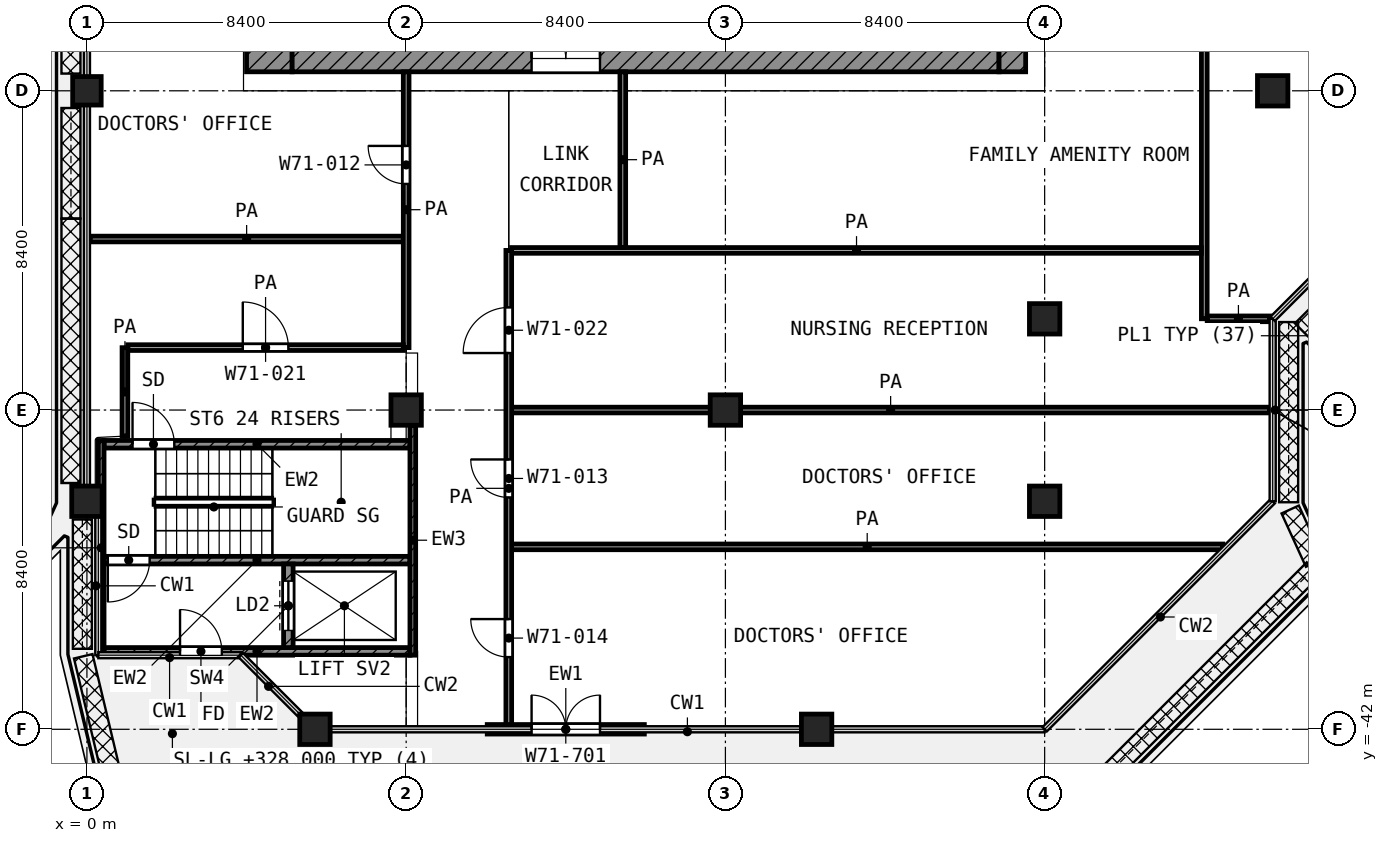
"""IFC4 building model, lengths in metres.
Left out: names, types, materials, properties, quantities, classifications, styles, units other than length and angle.
Written with IfcOpenShell. Run it as: python <this file> out.ifc"""

import sys

from ifc_helpers import new_model, si_unit, direction, frame, frame_2d, origin, origin_2d, place, context, subcontext, project, spatial, rectangle, extrude, element, fill, save


model = new_model("IFC4")
c1 = context("Model", 3, precision=1e-05, world=origin(), true_north=direction((0.0, 1.0)))
c2 = subcontext(c1, "Body", "Model", "MODEL_VIEW")
j1 = project(units=[si_unit("LENGTHUNIT", "METRE"), si_unit("PLANEANGLEUNIT", "RADIAN")], contexts=[c1])
p1 = place(None, origin())
s1 = spatial("IfcSite", under=j1, at=p1, CompositionType="ELEMENT")
p2 = place(p1, origin())
s2 = spatial("IfcBuilding", under=s1, at=p2, CompositionType="ELEMENT")
p3 = place(p2, frame((0.0, 0.0, 328.0)))
s3 = spatial("IfcBuildingStorey", under=s2, at=p3, CompositionType="ELEMENT", Elevation=328.0)
p4 = place(p3, frame((0.0, -25.2, 0.0), z_axis=(0.0, 0.0, 1.0), x_axis=(1.0, 0.0, 0.0)))
e1 = element("IfcColumn", 1, at=p4, inside=s3, PredefinedType="COLUMN", context=c2, shape_type="SweptSolid", body=[
    extrude(rectangle(XDim=0.75, YDim=0.75, at=origin_2d()), origin(), (0.0, 0.0, 1.0), 4.2),
])
for number, where, z_axis, x_axis in (
    (2, (31.2, -25.2, 0.0), (0.0, 0.0, 1.0), (1.0, 0.0, 0.0)),
    (3, (25.2, -31.2, 0.0), (0.0, 0.0, 1.0), (1.0, 0.0, 0.0)),
    (4, (8.4, -33.6, 0.0), (0.0, 0.0, 1.0), (1.0, 0.0, 0.0)),
    (5, (16.8, -33.6, 0.0), (0.0, 0.0, 1.0), (1.0, 0.0, 0.0)),
    (6, (0.0, -36.0, 0.0), (0.0, 0.0, 1.0), (1.0, 0.0, 0.0)),
    (7, (25.2, -36.0, 0.0), (0.0, 0.0, 1.0), (1.0, 0.0, 0.0)),
    (8, (6.0, -42.0, 0.0), (0.0, 0.0, 1.0), (1.0, 0.0, 0.0)),
    (9, (19.2, -42.0, 0.0), (0.0, 0.0, 1.0), (1.0, 0.0, 0.0)),
):
    element("IfcColumn", number, at=place(p3, frame(where, z_axis=z_axis, x_axis=x_axis)), inside=s3, PredefinedType="COLUMN", context=c2, shape_type="SweptSolid", body=[
        extrude(rectangle(XDim=0.8, YDim=0.8, at=origin_2d()), origin(), (0.0, 0.0, 1.0), 4.2),
    ])
p5 = place(p3, frame((10.533, -42.0, 0.0), z_axis=(0.0, 0.0, 1.0), x_axis=(1.0, 0.0, 0.0)))
e10 = element("IfcWall", 10, at=p5, inside=s3, PredefinedType="SOLIDWALL", context=c2, shape_type="SweptSolid", body=[
    extrude(rectangle(XDim=4.133, YDim=0.25, at=frame_2d((2.067, 0.0))), origin(), (0.0, 0.0, 1.0), 3.66),
])
p6 = place(p5, frame((1.167, 0.0, 0.0)))
e11 = element("IfcOpeningElement", 11, at=p6, cuts=e10, PredefinedType="OPENING", context=c2, shape_type="SweptSolid", body=[
    extrude(rectangle(XDim=1.8, YDim=2.1, at=frame_2d((0.9, 1.05))), frame((0.0, 0.135, 0.0), z_axis=(0.0, -1.0, 0.0), x_axis=(1.0, 0.0, 0.0)), (0.0, 0.0, 1.0), 0.27),
])
p7 = place(p3, frame((4.8, -24.7, 0.0), z_axis=(0.0, 0.0, 1.0), x_axis=(0.0, 1.0, 0.0)))
e12 = element("IfcWall", 12, at=p7, inside=s3, PredefinedType="SHEAR", context=c2, shape_type="SweptSolid", body=[
    extrude(rectangle(XDim=19.3, YDim=1.2, at=frame_2d((9.65, 0.0))), origin(), (0.0, 0.0, 1.0), 3.78),
])
p8 = place(p7, frame((11.15, 0.0, 0.0)))
e13 = element("IfcOpeningElement", 13, at=p8, cuts=e12, PredefinedType="OPENING", context=c2, shape_type="SweptSolid", body=[
    extrude(rectangle(XDim=1.1, YDim=2.1, at=frame_2d((0.55, 1.05))), frame((0.0, 0.61, 0.0), z_axis=(0.0, -1.0, 0.0), x_axis=(1.0, 0.0, 0.0)), (0.0, 0.0, 1.0), 1.22),
])
p9 = place(p7, frame((1.85, 0.0, 0.0)))
e14 = element("IfcOpeningElement", 14, at=p9, cuts=e12, PredefinedType="OPENING", context=c2, shape_type="SweptSolid", body=[
    extrude(rectangle(XDim=1.1, YDim=2.1, at=frame_2d((0.55, 1.05))), frame((0.0, 0.61, 0.0), z_axis=(0.0, -1.0, 0.0), x_axis=(1.0, 0.0, 0.0)), (0.0, 0.0, 1.0), 1.22),
])
p10 = place(p3, frame((5.4, -24.35, 0.0), z_axis=(0.0, 0.0, 1.0), x_axis=(1.0, 0.0, 0.0)))
e15 = element("IfcWall", 15, at=p10, inside=s3, PredefinedType="SHEAR", context=c2, shape_type="SweptSolid", body=[
    extrude(rectangle(XDim=18.6, YDim=0.7, at=frame_2d((9.3, 0.0))), origin(), (0.0, 0.0, 1.0), 3.78),
])
p11 = place(p10, frame((6.3, 0.0, 0.0)))
e16 = element("IfcOpeningElement", 16, at=p11, cuts=e15, PredefinedType="OPENING", context=c2, shape_type="SweptSolid", body=[
    extrude(rectangle(XDim=1.8, YDim=2.1, at=frame_2d((0.9, 1.05))), frame((0.0, 0.36, 0.0), z_axis=(0.0, -1.0, 0.0), x_axis=(1.0, 0.0, 0.0)), (0.0, 0.0, 1.0), 0.72),
])
p12 = place(p3, frame((24.35, -24.7, 0.0), z_axis=(0.0, 0.0, 1.0), x_axis=(0.0, 1.0, 0.0)))
e17 = element("IfcWall", 17, at=p12, inside=s3, PredefinedType="SHEAR", context=c2, shape_type="SweptSolid", body=[
    extrude(rectangle(XDim=0.7, YDim=0.7, at=frame_2d((0.35, 0.0))), origin(), (0.0, 0.0, 1.0), 3.78),
])
p13 = place(p3, frame((0.375, -40.05, 0.0), z_axis=(0.0, 0.0, 1.0), x_axis=(0.0, 1.0, 0.0)))
e18 = element("IfcWall", 18, at=p13, inside=s3, PredefinedType="SHEAR", context=c2, shape_type="SweptSolid", body=[
    extrude(rectangle(XDim=5.65, YDim=0.15, at=frame_2d((2.825, 0.0))), origin(), (0.0, 0.0, 1.0), 3.78),
])
p14 = place(p3, frame((8.575, -40.05, 0.0), z_axis=(0.0, 0.0, 1.0), x_axis=(0.0, 1.0, 0.0)))
e19 = element("IfcWall", 19, at=p14, inside=s3, PredefinedType="SHEAR", context=c2, shape_type="SweptSolid", body=[
    extrude(rectangle(XDim=6.05, YDim=0.15, at=frame_2d((3.025, 0.0))), origin(), (0.0, 0.0, 1.0), 3.78),
])
p15 = place(p3, frame((0.45, -34.5, 0.0), z_axis=(0.0, 0.0, 1.0), x_axis=(1.0, 0.0, 0.0)))
e20 = element("IfcWall", 20, at=p15, inside=s3, PredefinedType="SHEAR", context=c2, shape_type="SweptSolid", body=[
    extrude(rectangle(XDim=8.05, YDim=0.2, at=frame_2d((4.025, 0.0))), origin(), (0.0, 0.0, 1.0), 3.78),
])
p16 = place(p15, frame((0.75, 0.0, 0.0)))
e21 = element("IfcOpeningElement", 21, at=p16, cuts=e20, PredefinedType="OPENING", context=c2, shape_type="SweptSolid", body=[
    extrude(rectangle(XDim=1.1, YDim=2.1, at=frame_2d((0.55, 1.05))), frame((0.0, 0.11, 0.0), z_axis=(0.0, -1.0, 0.0), x_axis=(1.0, 0.0, 0.0)), (0.0, 0.0, 1.0), 0.22),
])
p17 = place(p3, frame((0.45, -37.55, 0.0), z_axis=(0.0, 0.0, 1.0), x_axis=(1.0, 0.0, 0.0)))
e22 = element("IfcWall", 22, at=p17, inside=s3, PredefinedType="SHEAR", context=c2, shape_type="SweptSolid", body=[
    extrude(rectangle(XDim=8.05, YDim=0.2, at=frame_2d((4.025, 0.0))), origin(), (0.0, 0.0, 1.0), 3.78),
])
p18 = place(p17, frame((0.1, 0.0, 0.0)))
e23 = element("IfcOpeningElement", 23, at=p18, cuts=e22, PredefinedType="OPENING", context=c2, shape_type="SweptSolid", body=[
    extrude(rectangle(XDim=1.1, YDim=2.1, at=frame_2d((0.55, 1.05))), frame((0.0, 0.11, 0.0), z_axis=(0.0, -1.0, 0.0), x_axis=(1.0, 0.0, 0.0)), (0.0, 0.0, 1.0), 0.22),
])
p19 = place(p3, frame((0.45, -39.95, 0.0), z_axis=(0.0, 0.0, 1.0), x_axis=(1.0, 0.0, 0.0)))
e24 = element("IfcWall", 24, at=p19, inside=s3, PredefinedType="SHEAR", context=c2, shape_type="SweptSolid", body=[
    extrude(rectangle(XDim=8.05, YDim=0.2, at=frame_2d((4.025, 0.0))), origin(), (0.0, 0.0, 1.0), 3.78),
])
p20 = place(p19, frame((2.0, 0.0, 0.0)))
e25 = element("IfcOpeningElement", 25, at=p20, cuts=e24, PredefinedType="OPENING", context=c2, shape_type="SweptSolid", body=[
    extrude(rectangle(XDim=1.1, YDim=2.1, at=frame_2d((0.55, 1.05))), frame((0.0, 0.11, 0.0), z_axis=(0.0, -1.0, 0.0), x_axis=(1.0, 0.0, 0.0)), (0.0, 0.0, 1.0), 0.22),
])
p21 = place(p3, frame((5.3, -39.85, 0.0), z_axis=(0.0, 0.0, 1.0), x_axis=(0.0, 1.0, 0.0)))
e26 = element("IfcWall", 26, at=p21, inside=s3, PredefinedType="SHEAR", context=c2, shape_type="SweptSolid", body=[
    extrude(rectangle(XDim=2.2, YDim=0.25, at=frame_2d((1.1, 0.0))), origin(), (0.0, 0.0, 1.0), 3.78),
])
p22 = place(p21, frame((0.45, 0.0, 0.0)))
e27 = element("IfcOpeningElement", 27, at=p22, cuts=e26, PredefinedType="OPENING", context=c2, shape_type="SweptSolid", body=[
    extrude(rectangle(XDim=1.3, YDim=2.1, at=frame_2d((0.65, 1.05))), frame((0.0, 0.135, 0.0), z_axis=(0.0, -1.0, 0.0), x_axis=(1.0, 0.0, 0.0)), (0.0, 0.0, 1.0), 0.27),
])
p23 = place(p3, frame((11.175, -37.2, 0.0), z_axis=(0.0, 0.0, 1.0), x_axis=(1.0, 0.0, 0.0)))
e28 = element("IfcWall", 28, at=p23, inside=s3, PredefinedType="PARTITIONING", context=c2, shape_type="SweptSolid", body=[
    extrude(rectangle(XDim=18.712, YDim=0.15, at=frame_2d((9.356, 0.0))), origin(), (0.0, 0.0, 1.0), 3.78),
])
p24 = place(p3, frame((11.175, -33.6, 0.0), z_axis=(0.0, 0.0, 1.0), x_axis=(1.0, 0.0, 0.0)))
e29 = element("IfcWall", 29, at=p24, inside=s3, PredefinedType="PARTITIONING", context=c2, shape_type="SweptSolid", body=[
    extrude(rectangle(XDim=19.945, YDim=0.15, at=frame_2d((9.973, 0.0))), origin(), (0.0, 0.0, 1.0), 3.78),
])
p25 = place(p3, frame((1.076, -31.957, 0.0), z_axis=(0.0, 0.0, 1.0), x_axis=(1.0, 0.0, 0.0)))
e30 = element("IfcWall", 30, at=p25, inside=s3, PredefinedType="PARTITIONING", context=c2, shape_type="SweptSolid", body=[
    extrude(rectangle(XDim=7.249, YDim=0.15, at=frame_2d((3.625, 0.0))), origin(), (0.0, 0.0, 1.0), 3.78),
])
p26 = place(p25, frame((3.025, 0.0, 0.0)))
e31 = element("IfcOpeningElement", 31, at=p26, cuts=e30, PredefinedType="OPENING", context=c2, shape_type="SweptSolid", body=[
    extrude(rectangle(XDim=1.2, YDim=2.1, at=frame_2d((0.6, 1.05))), frame((0.0, 0.085, 0.0), z_axis=(0.0, -1.0, 0.0), x_axis=(1.0, 0.0, 0.0)), (0.0, 0.0, 1.0), 0.17),
])
p27 = place(p3, frame((29.477, -31.2, 0.0), z_axis=(0.0, 0.0, 1.0), x_axis=(1.0, 0.0, 0.0)))
e32 = element("IfcWall", 32, at=p27, inside=s3, PredefinedType="PARTITIONING", context=c2, shape_type="SweptSolid", body=[
    extrude(rectangle(XDim=1.643, YDim=0.15, at=frame_2d((0.822, 0.0))), origin(), (0.0, 0.0, 1.0), 3.78),
])
p28 = place(p3, frame((11.175, -29.4, 0.0), z_axis=(0.0, 0.0, 1.0), x_axis=(1.0, 0.0, 0.0)))
e33 = element("IfcWall", 33, at=p28, inside=s3, PredefinedType="PARTITIONING", context=c2, shape_type="SweptSolid", body=[
    extrude(rectangle(XDim=18.15, YDim=0.15, at=frame_2d((9.075, 0.0))), origin(), (0.0, 0.0, 1.0), 3.78),
])
p29 = place(p3, frame((0.08, -29.1, 0.0), z_axis=(0.0, 0.0, 1.0), x_axis=(1.0, 0.0, 0.0)))
e34 = element("IfcWall", 34, at=p29, inside=s3, PredefinedType="PARTITIONING", context=c2, shape_type="SweptSolid", body=[
    extrude(rectangle(XDim=8.245, YDim=0.15, at=frame_2d((4.123, 0.0))), origin(), (0.0, 0.0, 1.0), 3.78),
])
p30 = place(p3, frame((1.0, -34.286, 0.0), z_axis=(0.0, 0.0, 1.0), x_axis=(0.0, 1.0, 0.0)))
e35 = element("IfcWall", 35, at=p30, inside=s3, PredefinedType="PARTITIONING", context=c2, shape_type="SweptSolid", body=[
    extrude(rectangle(XDim=2.327, YDim=0.15, at=frame_2d((1.164, 0.0))), origin(), (0.0, 0.0, 1.0), 3.78),
])
p31 = place(p3, frame((8.4, -31.957, 0.0), z_axis=(0.0, 0.0, 1.0), x_axis=(0.0, 1.0, 0.0)))
e36 = element("IfcWall", 36, at=p31, inside=s3, PredefinedType="PARTITIONING", context=c2, shape_type="SweptSolid", body=[
    extrude(rectangle(XDim=7.257, YDim=0.15, at=frame_2d((3.628, 0.0))), origin(), (0.0, 0.0, 1.0), 3.78),
])
p32 = place(p31, frame((4.307, 0.0, 0.0)))
e37 = element("IfcOpeningElement", 37, at=p32, cuts=e36, PredefinedType="OPENING", context=c2, shape_type="SweptSolid", body=[
    extrude(rectangle(XDim=1.0, YDim=2.1, at=frame_2d((0.5, 1.05))), frame((0.0, 0.085, 0.0), z_axis=(0.0, -1.0, 0.0), x_axis=(1.0, 0.0, 0.0)), (0.0, 0.0, 1.0), 0.17),
])
p33 = place(p3, frame((11.1, -41.92, 0.0), z_axis=(0.0, 0.0, 1.0), x_axis=(0.0, 1.0, 0.0)))
e38 = element("IfcWall", 38, at=p33, inside=s3, PredefinedType="PARTITIONING", context=c2, shape_type="SweptSolid", body=[
    extrude(rectangle(XDim=12.52, YDim=0.15, at=frame_2d((6.26, 0.0))), origin(), (0.0, 0.0, 1.0), 3.78),
])
p34 = place(p33, frame((9.82, 0.0, 0.0)))
e39 = element("IfcOpeningElement", 39, at=p34, cuts=e38, PredefinedType="OPENING", context=c2, shape_type="SweptSolid", body=[
    extrude(rectangle(XDim=1.2, YDim=2.1, at=frame_2d((0.6, 1.05))), frame((0.0, 0.085, 0.0), z_axis=(0.0, -1.0, 0.0), x_axis=(1.0, 0.0, 0.0)), (0.0, 0.0, 1.0), 0.17),
])
p35 = place(p33, frame((6.02, 0.0, 0.0)))
e40 = element("IfcOpeningElement", 40, at=p35, cuts=e38, PredefinedType="OPENING", context=c2, shape_type="SweptSolid", body=[
    extrude(rectangle(XDim=1.0, YDim=2.1, at=frame_2d((0.5, 1.05))), frame((0.0, 0.085, 0.0), z_axis=(0.0, -1.0, 0.0), x_axis=(1.0, 0.0, 0.0)), (0.0, 0.0, 1.0), 0.17),
])
p36 = place(p33, frame((1.82, 0.0, 0.0)))
e41 = element("IfcOpeningElement", 41, at=p36, cuts=e38, PredefinedType="OPENING", context=c2, shape_type="SweptSolid", body=[
    extrude(rectangle(XDim=1.0, YDim=2.1, at=frame_2d((0.5, 1.05))), frame((0.0, 0.085, 0.0), z_axis=(0.0, -1.0, 0.0), x_axis=(1.0, 0.0, 0.0)), (0.0, 0.0, 1.0), 0.17),
])
p37 = place(p3, frame((14.1, -29.325, 0.0), z_axis=(0.0, 0.0, 1.0), x_axis=(0.0, 1.0, 0.0)))
e42 = element("IfcWall", 42, at=p37, inside=s3, PredefinedType="PARTITIONING", context=c2, shape_type="SweptSolid", body=[
    extrude(rectangle(XDim=4.625, YDim=0.15, at=frame_2d((2.312, 0.0))), origin(), (0.0, 0.0, 1.0), 3.78),
])
p38 = place(p3, frame((29.4, -31.198, 0.0), z_axis=(0.0, 0.0, 1.0), x_axis=(0.0, 1.0, 0.0)))
e43 = element("IfcWall", 43, at=p38, inside=s3, PredefinedType="PARTITIONING", context=c2, shape_type="SweptSolid", body=[
    extrude(rectangle(XDim=20.098, YDim=0.15, at=frame_2d((10.049, 0.0))), origin(), (0.0, 0.0, 1.0), 3.78),
])
p39 = place(p6, origin())
e44 = element("IfcDoor", 44, at=p39, inside=s3, OperationType="DOUBLE_DOOR_SINGLE_SWING", PredefinedType="DOOR", context=c2, shape_type="SweptSolid", body=[
    extrude(rectangle(XDim=1.8, YDim=2.1, at=frame_2d((0.9, 1.05))), frame((0.0, 0.025, 0.0), z_axis=(0.0, -1.0, 0.0), x_axis=(1.0, 0.0, 0.0)), (0.0, 0.0, 1.0), 0.05),
])
fill(e11, e44)
p40 = place(p11, origin())
e45 = element("IfcDoor", 45, at=p40, inside=s3, OperationType="DOUBLE_DOOR_SINGLE_SWING", PredefinedType="DOOR", context=c2, shape_type="SweptSolid", body=[
    extrude(rectangle(XDim=1.8, YDim=2.1, at=frame_2d((0.9, 1.05))), frame((0.0, 0.025, 0.0), z_axis=(0.0, -1.0, 0.0), x_axis=(1.0, 0.0, 0.0)), (0.0, 0.0, 1.0), 0.05),
])
fill(e16, e45)
p41 = place(p16, origin())
e46 = element("IfcDoor", 46, at=p41, inside=s3, OperationType="SINGLE_SWING_LEFT", PredefinedType="DOOR", context=c2, shape_type="SweptSolid", body=[
    extrude(rectangle(XDim=1.1, YDim=2.1, at=frame_2d((0.55, 1.05))), frame((0.0, 0.025, 0.0), z_axis=(0.0, -1.0, 0.0), x_axis=(1.0, 0.0, 0.0)), (0.0, 0.0, 1.0), 0.05),
])
fill(e21, e46)
p42 = place(p18, frame((1.1, 0.0, 0.0), z_axis=(0.0, 0.0, 1.0), x_axis=(-1.0, 0.0, 0.0)))
e47 = element("IfcDoor", 47, at=p42, inside=s3, OperationType="SINGLE_SWING_LEFT", PredefinedType="DOOR", context=c2, shape_type="SweptSolid", body=[
    extrude(rectangle(XDim=1.1, YDim=2.1, at=frame_2d((0.55, 1.05))), frame((0.0, 0.025, 0.0), z_axis=(0.0, -1.0, 0.0), x_axis=(1.0, 0.0, 0.0)), (0.0, 0.0, 1.0), 0.05),
])
fill(e23, e47)
p43 = place(p22, origin())
e48 = element("IfcDoor", 48, at=p43, inside=s3, OperationType="DOUBLE_DOOR_SLIDING", PredefinedType="DOOR", context=c2, shape_type="SweptSolid", body=[
    extrude(rectangle(XDim=1.3, YDim=2.1, at=frame_2d((0.65, 1.05))), frame((0.0, 0.025, 0.0), z_axis=(0.0, -1.0, 0.0), x_axis=(1.0, 0.0, 0.0)), (0.0, 0.0, 1.0), 0.05),
])
fill(e27, e48)
p44 = place(p20, origin())
e49 = element("IfcDoor", 49, at=p44, inside=s3, OperationType="SINGLE_SWING_LEFT", PredefinedType="DOOR", context=c2, shape_type="SweptSolid", body=[
    extrude(rectangle(XDim=1.1, YDim=2.1, at=frame_2d((0.55, 1.05))), frame((0.0, 0.025, 0.0), z_axis=(0.0, -1.0, 0.0), x_axis=(1.0, 0.0, 0.0)), (0.0, 0.0, 1.0), 0.05),
])
fill(e25, e49)
p45 = place(p32, origin())
e50 = element("IfcDoor", 50, at=p45, inside=s3, OperationType="SINGLE_SWING_RIGHT", PredefinedType="DOOR", context=c2, shape_type="SweptSolid", body=[
    extrude(rectangle(XDim=1.0, YDim=2.1, at=frame_2d((0.5, 1.05))), frame((0.0, 0.025, 0.0), z_axis=(0.0, -1.0, 0.0), x_axis=(1.0, 0.0, 0.0)), (0.0, 0.0, 1.0), 0.05),
])
fill(e37, e50)
p46 = place(p26, origin())
e51 = element("IfcDoor", 51, at=p46, inside=s3, OperationType="SINGLE_SWING_LEFT", PredefinedType="DOOR", context=c2, shape_type="SweptSolid", body=[
    extrude(rectangle(XDim=1.2, YDim=2.1, at=frame_2d((0.6, 1.05))), frame((0.0, 0.025, 0.0), z_axis=(0.0, -1.0, 0.0), x_axis=(1.0, 0.0, 0.0)), (0.0, 0.0, 1.0), 0.05),
])
fill(e31, e51)
p47 = place(p34, origin())
e52 = element("IfcDoor", 52, at=p47, inside=s3, OperationType="SINGLE_SWING_LEFT", PredefinedType="DOOR", context=c2, shape_type="SweptSolid", body=[
    extrude(rectangle(XDim=1.2, YDim=2.1, at=frame_2d((0.6, 1.05))), frame((0.0, 0.025, 0.0), z_axis=(0.0, -1.0, 0.0), x_axis=(1.0, 0.0, 0.0)), (0.0, 0.0, 1.0), 0.05),
])
fill(e39, e52)
p48 = place(p35, origin())
e53 = element("IfcDoor", 53, at=p48, inside=s3, OperationType="SINGLE_SWING_RIGHT", PredefinedType="DOOR", context=c2, shape_type="SweptSolid", body=[
    extrude(rectangle(XDim=1.0, YDim=2.1, at=frame_2d((0.5, 1.05))), frame((0.0, 0.025, 0.0), z_axis=(0.0, -1.0, 0.0), x_axis=(1.0, 0.0, 0.0)), (0.0, 0.0, 1.0), 0.05),
])
fill(e40, e53)
p49 = place(p36, origin())
e54 = element("IfcDoor", 54, at=p49, inside=s3, OperationType="SINGLE_SWING_RIGHT", PredefinedType="DOOR", context=c2, shape_type="SweptSolid", body=[
    extrude(rectangle(XDim=1.0, YDim=2.1, at=frame_2d((0.5, 1.05))), frame((0.0, 0.025, 0.0), z_axis=(0.0, -1.0, 0.0), x_axis=(1.0, 0.0, 0.0)), (0.0, 0.0, 1.0), 0.05),
])
fill(e41, e54)
save(model, sys.argv[1])
